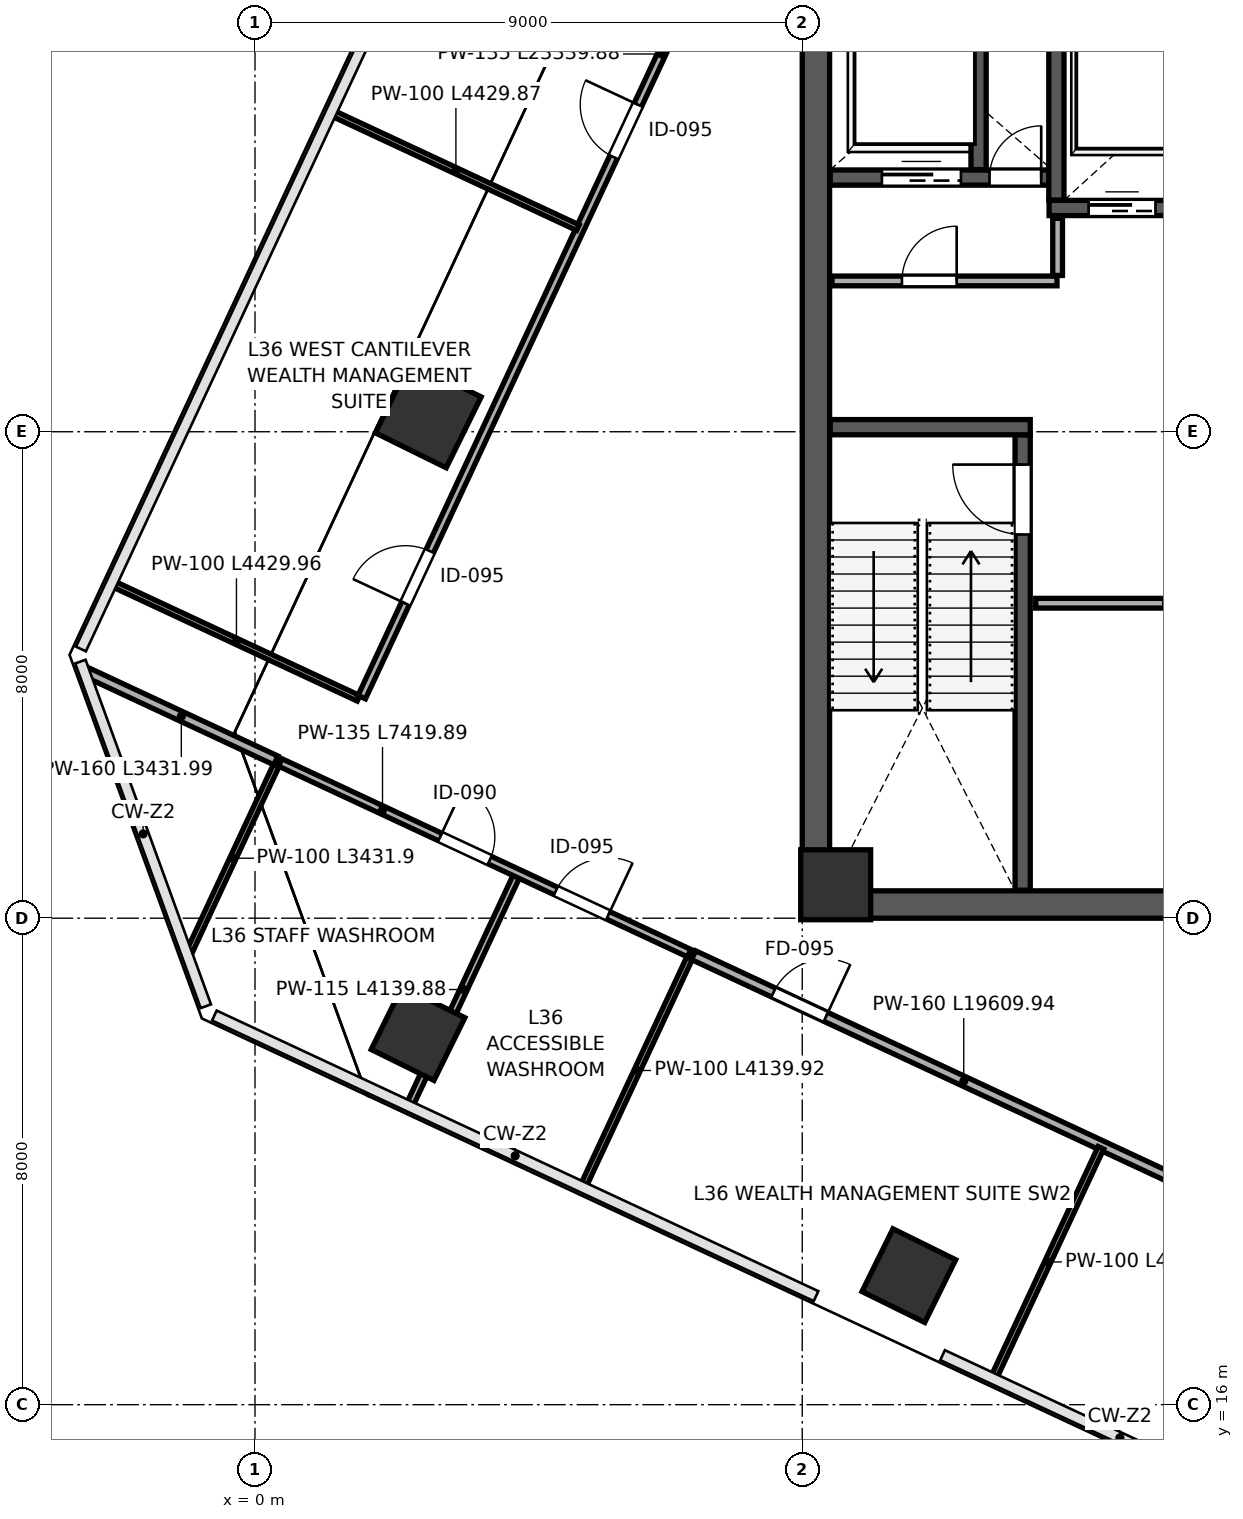
"""IFC4 building model, lengths in metres.
Left out: names, types, materials, properties, quantities, classifications, styles, units other than length and angle.
Written with IfcOpenShell. Run it as: python <this file> out.ifc"""

import sys

from ifc_helpers import new_model, si_unit, direction, frame, frame_2d, origin, origin_2d, place, context, subcontext, project, spatial, rectangle, extrude, clip, halfspace, source, transform, mapped, element, fill, save


model = new_model("IFC4")
c1 = context("Model", 3, precision=1e-05, world=origin(), true_north=direction((0.0, 1.0)))
c2 = subcontext(c1, "Body", "Model", "MODEL_VIEW")
j1 = project(units=[si_unit("LENGTHUNIT", "METRE"), si_unit("PLANEANGLEUNIT", "RADIAN")], contexts=[c1])
p1 = place(None, origin())
s1 = spatial("IfcSite", under=j1, at=p1, CompositionType="ELEMENT")
p2 = place(p1, origin())
s2 = spatial("IfcBuilding", under=s1, at=p2, CompositionType="ELEMENT")
p3 = place(p2, frame((0.0, 0.0, 162.4)))
s3 = spatial("IfcBuildingStorey", under=s2, at=p3, CompositionType="ELEMENT", Elevation=162.4)
m1 = source(origin(), c2, "Body", "SweptSolid", [
    extrude(rectangle(XDim=1.15, YDim=1.15, at=origin_2d()), origin(), (0.0, 0.0, 1.0), 4.199),
])
p4 = place(p3, frame((9.55, 24.55, 0.001), z_axis=(0.0, 0.0, 1.0), x_axis=(1.0, 0.0, 0.0)))
e1 = element("IfcColumn", 1, at=p4, inside=s3, PredefinedType="COLUMN", context=c2, shape_type="MappedRepresentation", body=[
    mapped(m1, transform((0.0, 0.0, 0.0), scale=1.0)),
])
p5 = place(p3, frame((2.682, 22.102, 0.0), z_axis=(-0.050032697629, 0.097754416153, 0.993952113178), x_axis=(0.998670124728, 0.017290764347, 0.048569655588)))
e2 = element("IfcColumn", 2, at=p5, inside=s3, PredefinedType="COLUMN", context=c2, shape_type="Clipping", body=[
    clip(clip(extrude(rectangle(XDim=1.15, YDim=1.15, at=origin_2d()), origin(), (0.0, 0.0, 1.0), 4.226), halfspace(frame((0.0, 0.0, 0.086), z_axis=(0.0, 0.0, -1.0), x_axis=(1.0, 0.0, 0.0)), False)), halfspace(frame((0.0, 0.0, 4.14), z_axis=(0.0, 0.0, 1.0), x_axis=(1.0, 0.0, 0.0)), False)),
])
p6 = place(p3, frame((10.754, 18.122, 0.0), z_axis=(-0.071199539327, 0.056380773418, 0.995867377711), x_axis=(0.90208675184, 0.429681267702, 0.040168399792)))
e3 = element("IfcColumn", 3, at=p6, inside=s3, PredefinedType="COLUMN", context=c2, shape_type="Clipping", body=[
    clip(clip(extrude(rectangle(XDim=1.15, YDim=1.15, at=origin_2d()), origin(), (0.0, 0.0, 1.0), 4.218), halfspace(frame((0.0, 0.0, 0.071), z_axis=(0.0, 0.0, -1.0), x_axis=(1.0, 0.0, 0.0)), False)), halfspace(frame((0.0, 0.0, 4.146), z_axis=(0.0, 0.0, 1.0), x_axis=(1.0, 0.0, 0.0)), False)),
])
p7 = place(p3, frame((2.849, 32.278, 0.0), z_axis=(0.002487773567, 0.096386761932, 0.995340847703), x_axis=(0.885215509994, -0.463222308644, 0.042644972057)))
e4 = element("IfcColumn", 4, at=p7, inside=s3, PredefinedType="COLUMN", context=c2, shape_type="Clipping", body=[
    clip(clip(extrude(rectangle(XDim=1.3, YDim=1.3, at=origin_2d()), origin(), (0.0, 0.0, 1.0), 4.22), halfspace(frame((0.0, 0.0, 0.085), z_axis=(0.0, 0.0, -1.0), x_axis=(1.0, 0.0, 0.0)), False)), halfspace(frame((0.0, 0.0, 4.135), z_axis=(0.0, 0.0, 1.0), x_axis=(1.0, 0.0, 0.0)), False)),
])
p8 = place(p3, frame((9.225, 24.45, 0.0), z_axis=(0.0, 0.0, 1.0), x_axis=(0.0, 1.0, 0.0)))
e5 = element("IfcWall", 5, at=p8, inside=s3, PredefinedType="SHEAR", context=c2, shape_type="SweptSolid", body=[
    extrude(rectangle(XDim=15.1, YDim=0.45, at=frame_2d((7.55, 0.0))), origin(), (0.0, 0.0, 1.0), 3.96),
])
p9 = place(p3, frame((9.0, 24.225, 0.0), z_axis=(0.0, 0.0, 1.0), x_axis=(1.0, 0.0, 0.0)))
e6 = element("IfcWall", 6, at=p9, inside=s3, PredefinedType="SHEAR", context=c2, shape_type="SweptSolid", body=[
    extrude(rectangle(XDim=18.0, YDim=0.45, at=frame_2d((9.0, 0.0))), origin(), (0.0, 0.0, 1.0), 3.96),
])
p10 = place(p3, frame((12.625, 24.46, 0.0), z_axis=(0.0, 0.0, 1.0), x_axis=(0.0, 1.0, 0.0)))
e7 = element("IfcWall", 7, at=p10, inside=s3, PredefinedType="SHEAR", context=c2, shape_type="SweptSolid", body=[
    extrude(rectangle(XDim=7.49, YDim=0.25, at=frame_2d((3.745, 0.0))), origin(), (0.0, 0.0, 1.0), 3.96),
])
p11 = place(p10, frame((5.85, 0.0, 0.0)))
e8 = element("IfcOpeningElement", 8, at=p11, cuts=e7, PredefinedType="OPENING", context=c2, shape_type="SweptSolid", body=[
    extrude(rectangle(XDim=1.15, YDim=2.2, at=frame_2d((0.575, 1.1))), frame((0.0, 0.135, 0.0), z_axis=(0.0, -1.0, 0.0), x_axis=(1.0, 0.0, 0.0)), (0.0, 0.0, 1.0), 0.27),
])
p12 = place(p3, frame((9.46, 32.075, 0.0), z_axis=(0.0, 0.0, 1.0), x_axis=(1.0, 0.0, 0.0)))
e9 = element("IfcWall", 9, at=p12, inside=s3, PredefinedType="SHEAR", context=c2, shape_type="SweptSolid", body=[
    extrude(rectangle(XDim=3.29, YDim=0.25, at=frame_2d((1.645, 0.0))), origin(), (0.0, 0.0, 1.0), 3.96),
])
p13 = place(p3, frame((9.46, 36.18, 0.0), z_axis=(0.0, 0.0, 1.0), x_axis=(1.0, 0.0, 0.0)))
e10 = element("IfcWall", 10, at=p13, inside=s3, PredefinedType="SHEAR", context=c2, shape_type="SweptSolid", body=[
    extrude(rectangle(XDim=3.79, YDim=0.25, at=frame_2d((1.895, 0.0))), origin(), (0.0, 0.0, 1.0), 3.96),
])
p14 = place(p13, frame((2.62, 0.0, 0.0)))
e11 = element("IfcOpeningElement", 11, at=p14, cuts=e10, PredefinedType="OPENING", context=c2, shape_type="SweptSolid", body=[
    extrude(rectangle(XDim=0.85, YDim=2.1, at=frame_2d((0.425, 1.05))), frame((0.0, 0.135, 0.0), z_axis=(0.0, -1.0, 0.0), x_axis=(1.0, 0.0, 0.0)), (0.0, 0.0, 1.0), 0.27),
])
p15 = place(p13, frame((0.85, 0.0, 0.0)))
e12 = element("IfcOpeningElement", 12, at=p15, cuts=e10, PredefinedType="OPENING", context=c2, shape_type="SweptSolid", body=[
    extrude(rectangle(XDim=1.3, YDim=2.25, at=frame_2d((0.65, 1.125))), frame((0.0, 0.135, 0.0), z_axis=(0.0, -1.0, 0.0), x_axis=(1.0, 0.0, 0.0)), (0.0, 0.0, 1.0), 0.27),
])
p16 = place(p3, frame((11.9, 36.31, 0.0), z_axis=(0.0, 0.0, 1.0), x_axis=(0.0, 1.0, 0.0)))
e13 = element("IfcWall", 13, at=p16, inside=s3, PredefinedType="SHEAR", context=c2, shape_type="SweptSolid", body=[
    extrude(rectangle(XDim=3.23, YDim=0.25, at=frame_2d((1.615, 0.0))), origin(), (0.0, 0.0, 1.0), 3.96),
])
p17 = place(p3, frame((13.06, 35.68, 0.0), z_axis=(0.0, 0.0, 1.0), x_axis=(1.0, 0.0, 0.0)))
e14 = element("IfcWall", 14, at=p17, inside=s3, PredefinedType="SHEAR", context=c2, shape_type="SweptSolid", body=[
    extrude(rectangle(XDim=4.25, YDim=0.25, at=frame_2d((2.125, 0.0))), origin(), (0.0, 0.0, 1.0), 3.96),
])
p18 = place(p17, frame((0.65, 0.0, 0.0)))
e15 = element("IfcOpeningElement", 15, at=p18, cuts=e14, PredefinedType="OPENING", context=c2, shape_type="SweptSolid", body=[
    extrude(rectangle(XDim=1.1, YDim=2.2, at=frame_2d((0.55, 1.1))), frame((0.0, 0.135, 0.0), z_axis=(0.0, -1.0, 0.0), x_axis=(1.0, 0.0, 0.0)), (0.0, 0.0, 1.0), 0.27),
])
p19 = place(p17, frame((2.65, 0.0, 0.0)))
e16 = element("IfcOpeningElement", 16, at=p19, cuts=e14, PredefinedType="OPENING", context=c2, shape_type="SweptSolid", body=[
    extrude(rectangle(XDim=1.1, YDim=2.2, at=frame_2d((0.55, 1.1))), frame((0.0, 0.135, 0.0), z_axis=(0.0, -1.0, 0.0), x_axis=(1.0, 0.0, 0.0)), (0.0, 0.0, 1.0), 0.27),
])
p20 = place(p3, frame((13.18, 35.81, 0.0), z_axis=(0.0, 0.0, 1.0), x_axis=(0.0, 1.0, 0.0)))
e17 = element("IfcWall", 17, at=p20, inside=s3, PredefinedType="SHEAR", context=c2, shape_type="SweptSolid", body=[
    extrude(rectangle(XDim=3.73, YDim=0.25, at=frame_2d((1.865, 0.0))), origin(), (0.0, 0.0, 1.0), 3.96),
])
p21 = place(p3, frame((9.49, 34.48, 0.0), z_axis=(0.0, 0.0, 1.0), x_axis=(1.0, 0.0, 0.0)))
e18 = element("IfcWall", 18, at=p21, inside=s3, PredefinedType="PARTITIONING", context=c2, shape_type="SweptSolid", body=[
    extrude(rectangle(XDim=3.7, YDim=0.16, at=frame_2d((1.85, 0.0))), origin(), (0.0, 0.0, 1.0), 3.96),
])
p22 = place(p21, frame((1.15, 0.0, 0.0)))
e19 = element("IfcOpeningElement", 19, at=p22, cuts=e18, PredefinedType="OPENING", context=c2, shape_type="SweptSolid", body=[
    extrude(rectangle(XDim=0.9, YDim=2.15, at=frame_2d((0.45, 1.075))), frame((0.0, 0.09, 0.0), z_axis=(0.0, -1.0, 0.0), x_axis=(1.0, 0.0, 0.0)), (0.0, 0.0, 1.0), 0.18),
])
p23 = place(p3, frame((13.2, 34.57, 0.0), z_axis=(0.0, 0.0, 1.0), x_axis=(0.0, 1.0, 0.0)))
e20 = element("IfcWall", 20, at=p23, inside=s3, PredefinedType="PARTITIONING", context=c2, shape_type="SweptSolid", body=[
    extrude(rectangle(XDim=0.94, YDim=0.16, at=frame_2d((0.47, 0.0))), origin(), (0.0, 0.0, 1.0), 3.96),
])
p24 = place(p3, frame((12.84, 29.18, 0.0), z_axis=(0.0, 0.0, 1.0), x_axis=(1.0, 0.0, 0.0)))
e21 = element("IfcWall", 21, at=p24, inside=s3, PredefinedType="PARTITIONING", context=c2, shape_type="SweptSolid", body=[
    extrude(rectangle(XDim=8.37, YDim=0.16, at=frame_2d((4.185, 0.0))), origin(), (0.0, 0.0, 1.0), 3.96),
])
p25 = place(p24, frame((2.1, 0.0, 0.0)))
e22 = element("IfcOpeningElement", 22, at=p25, cuts=e21, PredefinedType="OPENING", context=c2, shape_type="SweptSolid", body=[
    extrude(rectangle(XDim=0.9, YDim=2.15, at=frame_2d((0.45, 1.075))), frame((0.0, 0.09, 0.0), z_axis=(0.0, -1.0, 0.0), x_axis=(1.0, 0.0, 0.0)), (0.0, 0.0, 1.0), 0.18),
])
p26 = place(p24, frame((6.2, 0.0, 0.0)))
e23 = element("IfcOpeningElement", 23, at=p26, cuts=e21, PredefinedType="OPENING", context=c2, shape_type="SweptSolid", body=[
    extrude(rectangle(XDim=0.85, YDim=2.1, at=frame_2d((0.425, 1.05))), frame((0.0, 0.09, 0.0), z_axis=(0.0, -1.0, 0.0), x_axis=(1.0, 0.0, 0.0)), (0.0, 0.0, 1.0), 0.18),
])
p27 = place(p3, frame((-1.088, 23.431, 0.0), z_axis=(0.0, 0.0, 1.0), x_axis=(0.422632310917, 0.906301235665, 0.0)))
e24 = element("IfcWall", 24, at=p27, inside=s3, PredefinedType="PARTITIONING", context=c2, shape_type="SweptSolid", body=[
    extrude(rectangle(XDim=3.432, YDim=0.1, at=frame_2d((1.716, 0.0))), origin(), (0.0, 0.0, 1.0), 3.96),
])
p28 = place(p3, frame((-2.767, 28.045, 0.0), z_axis=(0.0, 0.0, 1.0), x_axis=(0.906313941013, -0.422605064246, 0.0)))
e25 = element("IfcWall", 25, at=p28, inside=s3, PredefinedType="PARTITIONING", context=c2, shape_type="SweptSolid", body=[
    extrude(rectangle(XDim=3.432, YDim=0.16, at=frame_2d((1.716, 0.0))), origin(), (0.0, 0.0, 1.0), 3.96),
])
p29 = place(p3, frame((2.556, 20.951, 0.0), z_axis=(0.0, 0.0, 1.0), x_axis=(0.422607794095, 0.906312668106, 0.0)))
e26 = element("IfcWall", 26, at=p29, inside=s3, PredefinedType="PARTITIONING", context=c2, shape_type="SweptSolid", body=[
    extrude(rectangle(XDim=4.14, YDim=0.115, at=frame_2d((2.07, 0.0))), origin(), (0.0, 0.0, 1.0), 3.195),
])
p30 = place(p3, frame((5.41, 19.62, 0.0), z_axis=(0.0, 0.0, 1.0), x_axis=(0.422656233697, 0.906290079454, 0.0)))
e27 = element("IfcWall", 27, at=p30, inside=s3, PredefinedType="PARTITIONING", context=c2, shape_type="SweptSolid", body=[
    extrude(rectangle(XDim=4.14, YDim=0.1, at=frame_2d((2.07, 0.0))), origin(), (0.0, 0.0, 1.0), 3.195),
])
p31 = place(p3, frame((0.416, 26.561, 0.0), z_axis=(0.0, 0.0, 1.0), x_axis=(0.906307511488, -0.422618852656, 0.0)))
e28 = element("IfcWall", 28, at=p31, inside=s3, PredefinedType="PARTITIONING", context=c2, shape_type="SweptSolid", body=[
    extrude(rectangle(XDim=7.42, YDim=0.135, at=frame_2d((3.71, 0.0))), origin(), (0.0, 0.0, 1.0), 3.96),
])
p32 = place(p31, frame((2.9, 0.0, 0.0)))
e29 = element("IfcOpeningElement", 29, at=p32, cuts=e28, PredefinedType="OPENING", context=c2, shape_type="SweptSolid", body=[
    extrude(rectangle(XDim=0.9, YDim=2.15, at=frame_2d((0.45, 1.075))), frame((0.0, 0.078, 0.0), z_axis=(0.0, -1.0, 0.0), x_axis=(1.0, 0.0, 0.0)), (0.0, 0.0, 1.0), 0.155),
])
p33 = place(p31, frame((5.0, 0.0, 0.0)))
e30 = element("IfcOpeningElement", 30, at=p33, cuts=e28, PredefinedType="OPENING", context=c2, shape_type="SweptSolid", body=[
    extrude(rectangle(XDim=0.95, YDim=2.15, at=frame_2d((0.475, 1.075))), frame((0.0, 0.078, 0.0), z_axis=(0.0, -1.0, 0.0), x_axis=(1.0, 0.0, 0.0)), (0.0, 0.0, 1.0), 0.155),
])
p34 = place(p3, frame((7.213, 23.391, 0.0), z_axis=(0.0, 0.0, 1.0), x_axis=(0.906304602938, -0.422625089996, 0.0)))
e31 = element("IfcWall", 31, at=p34, inside=s3, PredefinedType="PARTITIONING", context=c2, shape_type="SweptSolid", body=[
    extrude(rectangle(XDim=19.61, YDim=0.16, at=frame_2d((9.805, 0.0))), origin(), (0.0, 0.0, 1.0), 3.96),
])
p35 = place(p34, frame((1.45, 0.0, 0.0)))
e32 = element("IfcOpeningElement", 32, at=p35, cuts=e31, PredefinedType="OPENING", context=c2, shape_type="SweptSolid", body=[
    extrude(rectangle(XDim=0.95, YDim=2.15, at=frame_2d((0.475, 1.075))), frame((0.0, 0.09, 0.0), z_axis=(0.0, -1.0, 0.0), x_axis=(1.0, 0.0, 0.0)), (0.0, 0.0, 1.0), 0.18),
])
p36 = place(p34, frame((8.7, 0.0, 0.0)))
e33 = element("IfcOpeningElement", 33, at=p36, cuts=e31, PredefinedType="OPENING", context=c2, shape_type="SweptSolid", body=[
    extrude(rectangle(XDim=0.95, YDim=2.15, at=frame_2d((0.475, 1.075))), frame((0.0, 0.09, 0.0), z_axis=(0.0, -1.0, 0.0), x_axis=(1.0, 0.0, 0.0)), (0.0, 0.0, 1.0), 0.18),
])
p37 = place(p3, frame((12.162, 16.471, 0.0), z_axis=(0.0, 0.0, 1.0), x_axis=(0.422656233697, 0.906290079454, 0.0)))
e34 = element("IfcWall", 34, at=p37, inside=s3, PredefinedType="PARTITIONING", context=c2, shape_type="SweptSolid", body=[
    extrude(rectangle(XDim=4.14, YDim=0.1, at=frame_2d((2.07, 0.0))), origin(), (0.0, 0.0, 1.0), 3.195),
])
p38 = place(p3, frame((11.673, 48.808, 0.0), z_axis=(0.0, 0.0, 1.0), x_axis=(0.906307085664, -0.422619765836, 0.0)))
e35 = element("IfcWall", 35, at=p38, inside=s3, PredefinedType="PARTITIONING", context=c2, shape_type="SweptSolid", body=[
    extrude(rectangle(XDim=26.31, YDim=0.135, at=frame_2d((13.155, 0.0))), origin(), (0.0, 0.0, 1.0), 3.96),
])
p39 = place(p38, frame((2.1, 0.0, 0.0)))
e36 = element("IfcOpeningElement", 36, at=p39, cuts=e35, PredefinedType="OPENING", context=c2, shape_type="SweptSolid", body=[
    extrude(rectangle(XDim=0.95, YDim=2.15, at=frame_2d((0.475, 1.075))), frame((0.0, 0.078, 0.0), z_axis=(0.0, -1.0, 0.0), x_axis=(1.0, 0.0, 0.0)), (0.0, 0.0, 1.0), 0.155),
])
p40 = place(p38, frame((18.2, 0.0, 0.0)))
e37 = element("IfcOpeningElement", 37, at=p40, cuts=e35, PredefinedType="OPENING", context=c2, shape_type="SweptSolid", body=[
    extrude(rectangle(XDim=0.95, YDim=2.15, at=frame_2d((0.475, 1.075))), frame((0.0, 0.078, 0.0), z_axis=(0.0, -1.0, 0.0), x_axis=(1.0, 0.0, 0.0)), (0.0, 0.0, 1.0), 0.155),
])
p41 = place(p3, frame((-2.312, 29.488, 0.0), z_axis=(0.0, 0.0, 1.0), x_axis=(0.906316851894, -0.422598821546, 0.0)))
e38 = element("IfcWall", 38, at=p41, inside=s3, PredefinedType="PARTITIONING", context=c2, shape_type="SweptSolid", body=[
    extrude(rectangle(XDim=4.43, YDim=0.1, at=frame_2d((2.215, 0.0))), origin(), (0.0, 0.0, 1.0), 3.96),
])
p42 = place(p3, frame((1.756, 27.635, 0.0), z_axis=(0.0, 0.0, 1.0), x_axis=(0.422615732035, 0.906308966653, 0.0)))
e39 = element("IfcWall", 39, at=p42, inside=s3, PredefinedType="PARTITIONING", context=c2, shape_type="SweptSolid", body=[
    extrude(rectangle(XDim=23.34, YDim=0.135, at=frame_2d((11.67, 0.0))), origin(), (0.0, 0.0, 1.0), 3.96),
])
p43 = place(p42, frame((1.7, 0.0, 0.0)))
e40 = element("IfcOpeningElement", 40, at=p43, cuts=e39, PredefinedType="OPENING", context=c2, shape_type="SweptSolid", body=[
    extrude(rectangle(XDim=0.95, YDim=2.15, at=frame_2d((0.475, 1.075))), frame((0.0, 0.078, 0.0), z_axis=(0.0, -1.0, 0.0), x_axis=(1.0, 0.0, 0.0)), (0.0, 0.0, 1.0), 0.155),
])
p44 = place(p42, frame((9.8, 0.0, 0.0)))
e41 = element("IfcOpeningElement", 41, at=p44, cuts=e39, PredefinedType="OPENING", context=c2, shape_type="SweptSolid", body=[
    extrude(rectangle(XDim=0.95, YDim=2.15, at=frame_2d((0.475, 1.075))), frame((0.0, 0.078, 0.0), z_axis=(0.0, -1.0, 0.0), x_axis=(1.0, 0.0, 0.0)), (0.0, 0.0, 1.0), 0.155),
])
p45 = place(p3, frame((1.297, 37.228, 0.0), z_axis=(0.0, 0.0, 1.0), x_axis=(0.906295742894, -0.422644089526, 0.0)))
e42 = element("IfcWall", 42, at=p45, inside=s3, PredefinedType="PARTITIONING", context=c2, shape_type="SweptSolid", body=[
    extrude(rectangle(XDim=4.43, YDim=0.1, at=frame_2d((2.215, 0.0))), origin(), (0.0, 0.0, 1.0), 3.195),
])
m2 = source(origin(), c2, "Body", "SweptSolid", [
    extrude(rectangle(XDim=1.15, YDim=2.2, at=frame_2d((0.575, 1.1))), frame((0.0, 0.025, 0.0), z_axis=(0.0, -1.0, 0.0), x_axis=(1.0, 0.0, 0.0)), (0.0, 0.0, 1.0), 0.05),
])
p46 = place(p11, origin())
e43 = element("IfcDoor", 43, at=p46, inside=s3, OperationType="SINGLE_SWING_RIGHT", PredefinedType="DOOR", context=c2, shape_type="MappedRepresentation", body=[
    mapped(m2, transform((0.0, 0.0, 0.0), scale=1.0)),
])
fill(e8, e43)
m3 = source(origin(), c2, "Body", "SweptSolid", [
    extrude(rectangle(XDim=0.85, YDim=2.1, at=frame_2d((0.425, 1.05))), frame((0.0, 0.025, 0.0), z_axis=(0.0, -1.0, 0.0), x_axis=(1.0, 0.0, 0.0)), (0.0, 0.0, 1.0), 0.05),
])
p47 = place(p14, origin())
e44 = element("IfcDoor", 44, at=p47, inside=s3, OperationType="SINGLE_SWING_RIGHT", PredefinedType="DOOR", context=c2, shape_type="MappedRepresentation", body=[
    mapped(m3, transform((0.0, 0.0, 0.0), scale=1.0)),
])
fill(e11, e44)
m4 = source(origin(), c2, "Body", "SweptSolid", [
    extrude(rectangle(XDim=1.1, YDim=2.2, at=frame_2d((0.55, 1.1))), frame((0.0, 0.025, 0.0), z_axis=(0.0, -1.0, 0.0), x_axis=(1.0, 0.0, 0.0)), (0.0, 0.0, 1.0), 0.05),
])
p48 = place(p18, origin())
e45 = element("IfcDoor", 45, at=p48, inside=s3, OperationType="SLIDING_TO_LEFT", PredefinedType="DOOR", context=c2, shape_type="MappedRepresentation", body=[
    mapped(m4, transform((0.0, 0.0, 0.0), scale=1.0)),
])
fill(e15, e45)
m5 = source(origin(), c2, "Body", "SweptSolid", [
    extrude(rectangle(XDim=1.3, YDim=2.25, at=frame_2d((0.65, 1.125))), frame((0.0, 0.025, 0.0), z_axis=(0.0, -1.0, 0.0), x_axis=(1.0, 0.0, 0.0)), (0.0, 0.0, 1.0), 0.05),
])
p49 = place(p15, origin())
e46 = element("IfcDoor", 46, at=p49, inside=s3, OperationType="SLIDING_TO_LEFT", PredefinedType="DOOR", context=c2, shape_type="MappedRepresentation", body=[
    mapped(m5, transform((0.0, 0.0, 0.0), scale=1.0)),
])
fill(e12, e46)
m6 = source(origin(), c2, "Body", "SweptSolid", [
    extrude(rectangle(XDim=0.9, YDim=2.15, at=frame_2d((0.45, 1.075))), frame((0.0, 0.025, 0.0), z_axis=(0.0, -1.0, 0.0), x_axis=(1.0, 0.0, 0.0)), (0.0, 0.0, 1.0), 0.05),
])
p50 = place(p22, origin())
e47 = element("IfcDoor", 47, at=p50, inside=s3, OperationType="SINGLE_SWING_RIGHT", PredefinedType="DOOR", context=c2, shape_type="MappedRepresentation", body=[
    mapped(m6, transform((0.0, 0.0, 0.0), scale=1.0)),
])
fill(e19, e47)
m7 = source(origin(), c2, "Body", "SweptSolid", [
    extrude(rectangle(XDim=0.9, YDim=2.15, at=frame_2d((0.45, 1.075))), frame((0.0, 0.025, 0.0), z_axis=(0.0, -1.0, 0.0), x_axis=(1.0, 0.0, 0.0)), (0.0, 0.0, 1.0), 0.05),
])
p51 = place(p32, origin())
e48 = element("IfcDoor", 48, at=p51, inside=s3, OperationType="SINGLE_SWING_LEFT", PredefinedType="DOOR", context=c2, shape_type="MappedRepresentation", body=[
    mapped(m7, transform((0.0, 0.0, 0.0), scale=1.0)),
])
fill(e29, e48)
m8 = source(origin(), c2, "Body", "SweptSolid", [
    extrude(rectangle(XDim=0.95, YDim=2.15, at=frame_2d((0.475, 1.075))), frame((0.0, 0.025, 0.0), z_axis=(0.0, -1.0, 0.0), x_axis=(1.0, 0.0, 0.0)), (0.0, 0.0, 1.0), 0.05),
])
p52 = place(p33, origin())
e49 = element("IfcDoor", 49, at=p52, inside=s3, OperationType="SINGLE_SWING_RIGHT", PredefinedType="DOOR", context=c2, shape_type="MappedRepresentation", body=[
    mapped(m8, transform((0.0, 0.0, 0.0), scale=1.0)),
])
fill(e30, e49)
m9 = source(origin(), c2, "Body", "SweptSolid", [
    extrude(rectangle(XDim=0.95, YDim=2.15, at=frame_2d((0.475, 1.075))), frame((0.0, 0.025, 0.0), z_axis=(0.0, -1.0, 0.0), x_axis=(1.0, 0.0, 0.0)), (0.0, 0.0, 1.0), 0.05),
])
p53 = place(p35, origin())
e50 = element("IfcDoor", 50, at=p53, inside=s3, OperationType="SINGLE_SWING_RIGHT", PredefinedType="DOOR", context=c2, shape_type="MappedRepresentation", body=[
    mapped(m9, transform((0.0, 0.0, 0.0), scale=1.0)),
])
fill(e32, e50)
p54 = place(p43, origin())
e51 = element("IfcDoor", 51, at=p54, inside=s3, OperationType="SINGLE_SWING_LEFT", PredefinedType="DOOR", context=c2, shape_type="MappedRepresentation", body=[
    mapped(m8, transform((0.0, 0.0, 0.0), scale=1.0)),
])
fill(e40, e51)
p55 = place(p44, origin())
e52 = element("IfcDoor", 52, at=p55, inside=s3, OperationType="SINGLE_SWING_RIGHT", PredefinedType="DOOR", context=c2, shape_type="MappedRepresentation", body=[
    mapped(m8, transform((0.0, 0.0, 0.0), scale=1.0)),
])
fill(e41, e52)
save(model, sys.argv[1])
